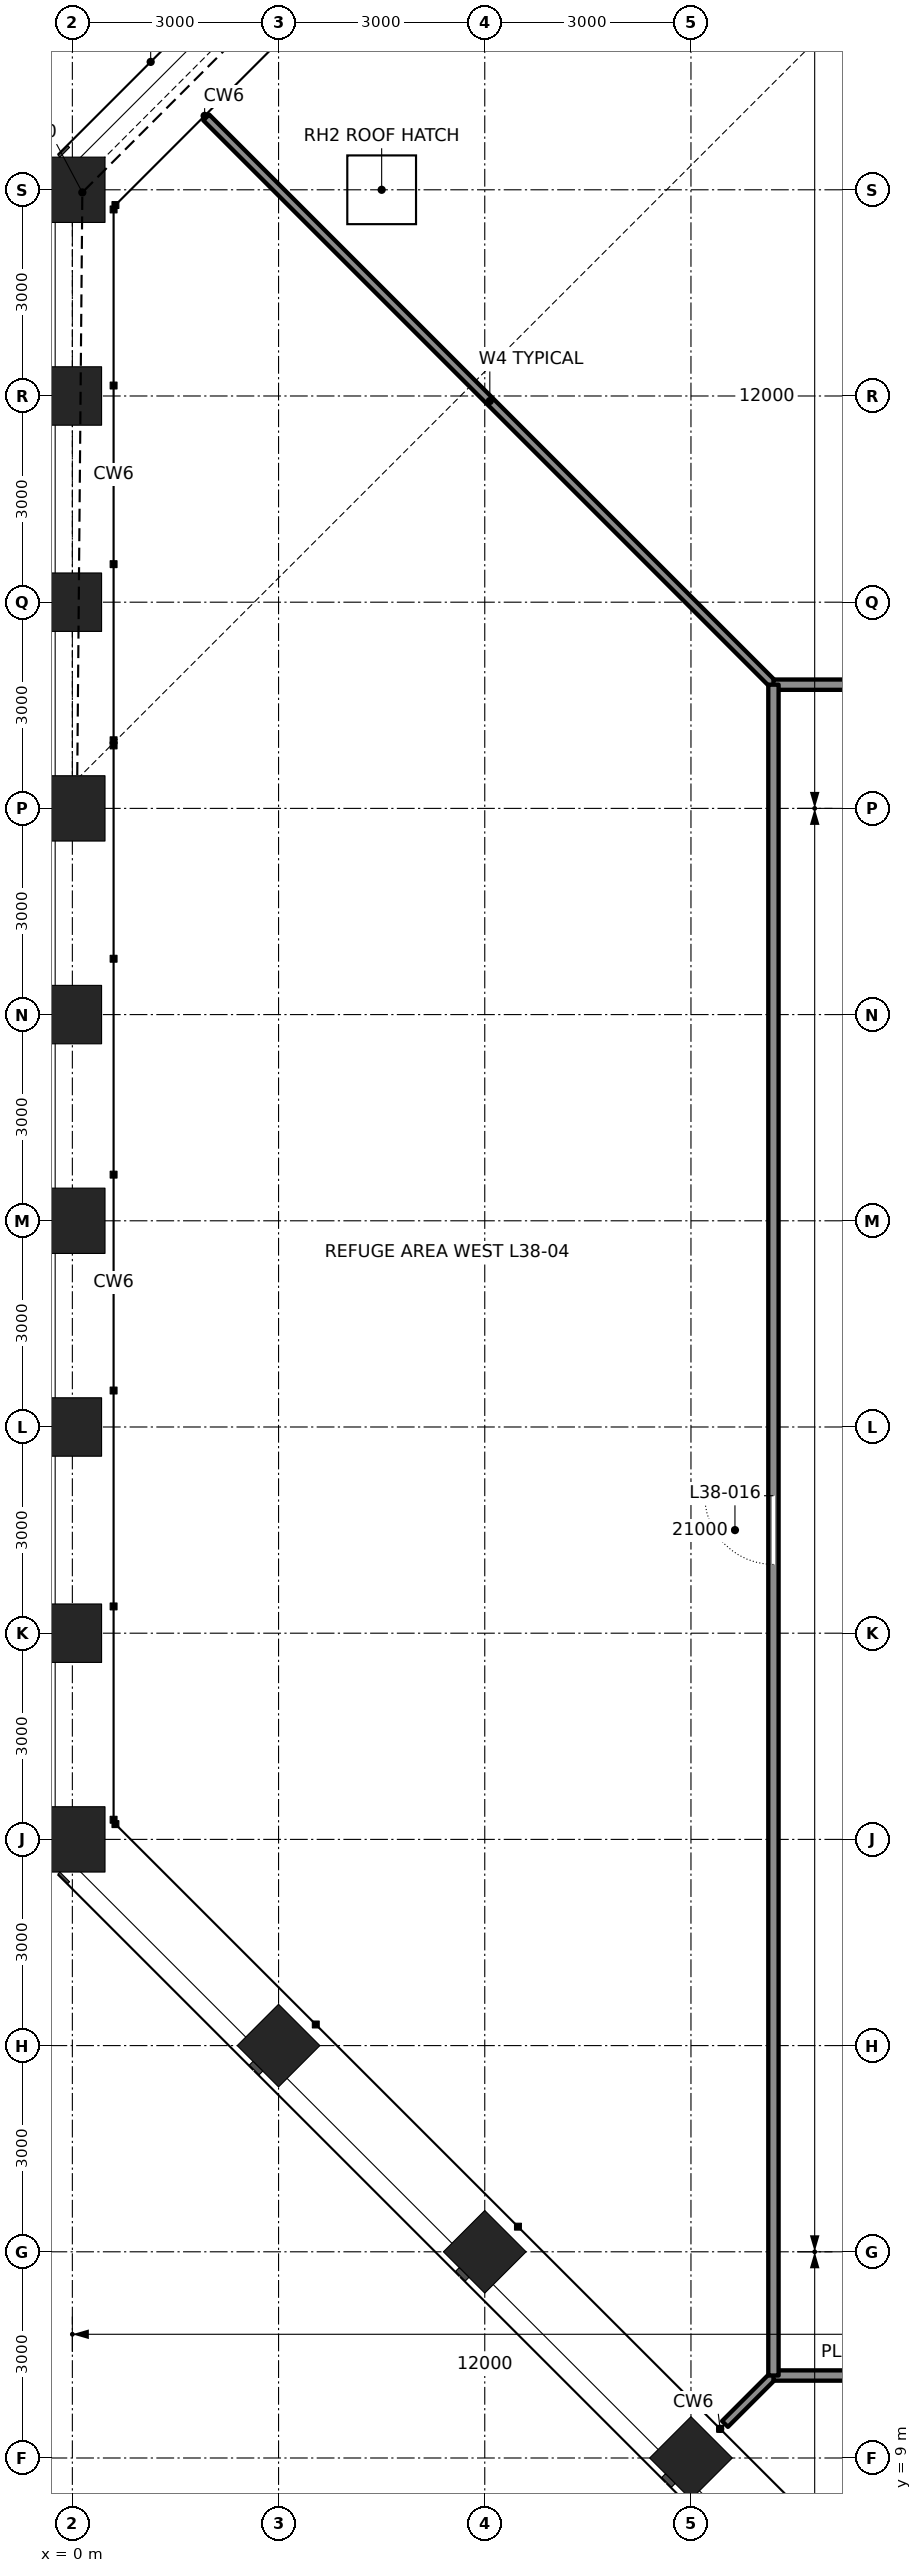
"""IFC4 building model, lengths in metres.
Left out: names, types, materials, properties, quantities, classifications, styles, units other than length and angle.
Written with IfcOpenShell. Run it as: python <this file> out.ifc"""

import sys

from ifc_helpers import new_model, si_unit, direction, frame, frame_2d, origin, origin_2d, place, context, subcontext, project, spatial, rectangle, hollow_rectangle, extrude, element, fill, save


model = new_model("IFC4")
c1 = context("Model", 3, precision=1e-05, world=origin(), true_north=direction((0.0, 1.0)))
c2 = subcontext(c1, "Body", "Model", "MODEL_VIEW")
j1 = project(units=[si_unit("LENGTHUNIT", "METRE"), si_unit("PLANEANGLEUNIT", "RADIAN")], contexts=[c1])
p1 = place(None, origin())
s1 = spatial("IfcSite", under=j1, at=p1, CompositionType="ELEMENT")
p2 = place(p1, origin())
s2 = spatial("IfcBuilding", under=s1, at=p2, CompositionType="ELEMENT")
p3 = place(p2, frame((0.0, 0.0, 174.0)))
s3 = spatial("IfcBuildingStorey", under=s2, at=p3, CompositionType="ELEMENT", Elevation=174.0)
p4 = place(p3, frame((0.0, 42.0, 0.0), z_axis=(0.0, 0.0, 1.0), x_axis=(-1.0, 0.0, 0.0)))
e1 = element("IfcColumn", 1, at=p4, inside=s3, PredefinedType="COLUMN", context=c2, shape_type="SweptSolid", body=[
    extrude(hollow_rectangle(XDim=0.95, YDim=0.95, WallThickness=0.095, at=origin_2d()), origin(), (0.0, 0.0, 1.0), 3.247),
])
p5 = place(p3, frame((0.0, 39.0, 0.0), z_axis=(0.0, 0.0, 1.0), x_axis=(-1.0, 0.0, 0.0)))
e2 = element("IfcColumn", 2, at=p5, inside=s3, PredefinedType="COLUMN", context=c2, shape_type="SweptSolid", body=[
    extrude(hollow_rectangle(XDim=0.85, YDim=0.85, WallThickness=0.085, at=origin_2d()), origin(), (0.0, 0.0, 1.0), 3.698),
])
p6 = place(p3, frame((0.0, 36.0, 0.0), z_axis=(0.0, 0.0, 1.0), x_axis=(-1.0, 0.0, 0.0)))
e3 = element("IfcColumn", 3, at=p6, inside=s3, PredefinedType="COLUMN", context=c2, shape_type="SweptSolid", body=[
    extrude(hollow_rectangle(XDim=0.85, YDim=0.85, WallThickness=0.085, at=origin_2d()), origin(), (0.0, 0.0, 1.0), 4.149),
])
p7 = place(p3, frame((0.0, 33.0, 0.0), z_axis=(0.0, 0.0, 1.0), x_axis=(-1.0, 0.0, 0.0)))
e4 = element("IfcColumn", 4, at=p7, inside=s3, PredefinedType="COLUMN", context=c2, shape_type="SweptSolid", body=[
    extrude(hollow_rectangle(XDim=0.95, YDim=0.95, WallThickness=0.11, at=origin_2d()), origin(), (0.0, 0.0, 1.0), 6.0),
])
p8 = place(p3, frame((0.0, 30.0, 0.0), z_axis=(0.0, 0.0, 1.0), x_axis=(-1.0, 0.0, 0.0)))
e5 = element("IfcColumn", 5, at=p8, inside=s3, PredefinedType="COLUMN", context=c2, shape_type="SweptSolid", body=[
    extrude(hollow_rectangle(XDim=0.85, YDim=0.85, WallThickness=0.085, at=origin_2d()), origin(), (0.0, 0.0, 1.0), 6.0),
])
p9 = place(p3, frame((0.0, 27.0, 0.0), z_axis=(0.0, 0.0, 1.0), x_axis=(-1.0, 0.0, 0.0)))
e6 = element("IfcColumn", 6, at=p9, inside=s3, PredefinedType="COLUMN", context=c2, shape_type="SweptSolid", body=[
    extrude(hollow_rectangle(XDim=0.95, YDim=0.95, WallThickness=0.11, at=origin_2d()), origin(), (0.0, 0.0, 1.0), 6.0),
])
for number, where, z_axis, x_axis in (
    (7, (0.0, 24.0, 0.0), (0.0, 0.0, 1.0), (-1.0, 0.0, 0.0)),
    (8, (0.0, 21.0, 0.0), (0.0, 0.0, 1.0), (-1.0, 0.0, 0.0)),
):
    element("IfcColumn", number, at=place(p3, frame(where, z_axis=z_axis, x_axis=x_axis)), inside=s3, PredefinedType="COLUMN", context=c2, shape_type="SweptSolid", body=[
        extrude(hollow_rectangle(XDim=0.85, YDim=0.85, WallThickness=0.085, at=origin_2d()), origin(), (0.0, 0.0, 1.0), 6.0),
    ])
p10 = place(p3, frame((0.0, 18.0, 0.0), z_axis=(0.0, 0.0, 1.0), x_axis=(-1.0, 0.0, 0.0)))
e9 = element("IfcColumn", 9, at=p10, inside=s3, PredefinedType="COLUMN", context=c2, shape_type="SweptSolid", body=[
    extrude(hollow_rectangle(XDim=0.95, YDim=0.95, WallThickness=0.095, at=origin_2d()), origin(), (0.0, 0.0, 1.0), 6.0),
])
for number, where, z_axis, x_axis in (
    (10, (3.0, 15.0, 0.0), (0.0, 0.0, 1.0), (-0.707, -0.707, 0.0)),
    (11, (6.0, 12.0, 0.0), (0.0, 0.0, 1.0), (-0.707, -0.707, 0.0)),
    (12, (9.0, 9.0, 0.0), (0.0, 0.0, 1.0), (-0.707, -0.707, 0.0)),
):
    element("IfcColumn", number, at=place(p3, frame(where, z_axis=z_axis, x_axis=x_axis)), inside=s3, PredefinedType="COLUMN", context=c2, shape_type="SweptSolid", body=[
        extrude(hollow_rectangle(XDim=0.85, YDim=0.85, WallThickness=0.085, at=origin_2d()), origin(), (0.0, 0.0, 1.0), 6.0),
    ])
p11 = place(p3, frame((10.2, 34.8, 0.0), z_axis=(0.0, 0.0, 1.0), x_axis=(-0.707106781187, 0.707106781187, 0.0)))
e13 = element("IfcWall", 13, at=p11, inside=s3, PredefinedType="PARTITIONING", context=c2, shape_type="SweptSolid", body=[
    extrude(rectangle(XDim=11.671, YDim=0.12, at=frame_2d((5.836, 0.0))), origin(), (0.0, 0.0, 1.0), 5.84),
])
p12 = place(p3, frame((10.2, 10.2, 0.0), z_axis=(0.0, 0.0, 1.0), x_axis=(-0.707106781187, -0.707106781187, 0.0)))
e14 = element("IfcWall", 14, at=p12, inside=s3, PredefinedType="PARTITIONING", context=c2, shape_type="SweptSolid", body=[
    extrude(rectangle(XDim=0.997, YDim=0.12, at=frame_2d((0.499, 0.0))), origin(), (0.0, 0.0, 1.0), 5.84),
])
p13 = place(p3, frame((10.2, 10.2, 0.0), z_axis=(0.0, 0.0, 1.0), x_axis=(1.0, 0.0, 0.0)))
e15 = element("IfcWall", 15, at=p13, inside=s3, PredefinedType="PARTITIONING", context=c2, shape_type="SweptSolid", body=[
    extrude(rectangle(XDim=24.6, YDim=0.15, at=frame_2d((12.3, 0.0))), origin(), (0.0, 0.0, 1.0), 5.84),
])
p14 = place(p13, frame((11.8, 0.0, 0.0)))
e16 = element("IfcOpeningElement", 16, at=p14, cuts=e15, PredefinedType="OPENING", context=c2, shape_type="SweptSolid", body=[
    extrude(rectangle(XDim=1.0, YDim=2.4, at=frame_2d((0.5, 1.2))), frame((0.0, 0.085, 0.0), z_axis=(0.0, -1.0, 0.0), x_axis=(1.0, 0.0, 0.0)), (0.0, 0.0, 1.0), 0.17),
])
p15 = place(p3, frame((10.2, 34.8, 0.0), z_axis=(0.0, 0.0, 1.0), x_axis=(1.0, 0.0, 0.0)))
e17 = element("IfcWall", 17, at=p15, inside=s3, PredefinedType="PARTITIONING", context=c2, shape_type="SweptSolid", body=[
    extrude(rectangle(XDim=24.6, YDim=0.15, at=frame_2d((12.3, 0.0))), origin(), (0.0, 0.0, 1.0), 5.84),
])
p16 = place(p15, frame((11.8, 0.0, 0.0)))
e18 = element("IfcOpeningElement", 18, at=p16, cuts=e17, PredefinedType="OPENING", context=c2, shape_type="SweptSolid", body=[
    extrude(rectangle(XDim=1.0, YDim=2.4, at=frame_2d((0.5, 1.2))), frame((0.0, 0.085, 0.0), z_axis=(0.0, -1.0, 0.0), x_axis=(1.0, 0.0, 0.0)), (0.0, 0.0, 1.0), 0.17),
])
p17 = place(p3, frame((10.2, 10.2, 0.0), z_axis=(0.0, 0.0, 1.0), x_axis=(0.0, 1.0, 0.0)))
e19 = element("IfcWall", 19, at=p17, inside=s3, PredefinedType="PARTITIONING", context=c2, shape_type="SweptSolid", body=[
    extrude(rectangle(XDim=24.6, YDim=0.15, at=frame_2d((12.3, 0.0))), origin(), (0.0, 0.0, 1.0), 5.84),
])
p18 = place(p17, frame((11.8, 0.0, 0.0)))
e20 = element("IfcOpeningElement", 20, at=p18, cuts=e19, PredefinedType="OPENING", context=c2, shape_type="SweptSolid", body=[
    extrude(rectangle(XDim=1.0, YDim=2.4, at=frame_2d((0.5, 1.2))), frame((0.0, 0.085, 0.0), z_axis=(0.0, -1.0, 0.0), x_axis=(1.0, 0.0, 0.0)), (0.0, 0.0, 1.0), 0.17),
])
p19 = place(p3, frame((4.5, 42.0, 4.819)))
p20 = place(p19, frame((0.0, 0.0, 0.454)))
e21 = element("IfcDoor", 21, at=p20, inside=s3, OperationType="SINGLE_SWING_LEFT", PredefinedType="TRAPDOOR", context=c2, shape_type="SweptSolid", body=[
    extrude(rectangle(XDim=1.0, YDim=1.0, at=origin_2d()), origin(), (0.0, 0.0, 1.0), 0.05),
])
p21 = place(p18, origin())
e22 = element("IfcDoor", 22, at=p21, inside=s3, OperationType="SINGLE_SWING_RIGHT", PredefinedType="DOOR", context=c2, shape_type="SweptSolid", body=[
    extrude(rectangle(XDim=1.0, YDim=2.4, at=frame_2d((0.5, 1.2))), frame((0.0, 0.025, 0.0), z_axis=(0.0, -1.0, 0.0), x_axis=(1.0, 0.0, 0.0)), (0.0, 0.0, 1.0), 0.05),
])
fill(e20, e22)
save(model, sys.argv[1])
